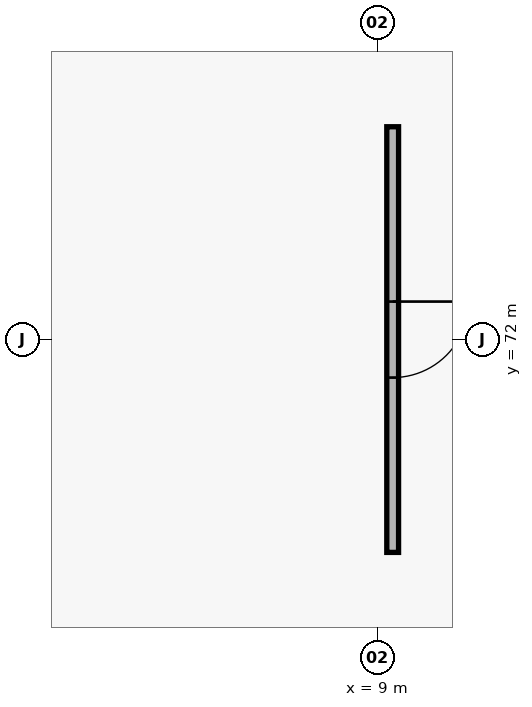
"""IFC4 building model, lengths in metres.
Left out: names, types, materials, properties, quantities, classifications, styles, units other than length and angle.
Written with IfcOpenShell. Run it as: python <this file> out.ifc"""

import sys

from ifc_helpers import new_model, si_unit, direction, frame, frame_2d, origin, place, context, subcontext, project, spatial, rectangle, extrude, element, fill, save


model = new_model("IFC4")
c1 = context("Model", 3, precision=1e-05, world=origin(), true_north=direction((0.0, 1.0)))
c2 = subcontext(c1, "Body", "Model", "MODEL_VIEW")
j1 = project(units=[si_unit("LENGTHUNIT", "METRE"), si_unit("PLANEANGLEUNIT", "RADIAN")], contexts=[c1])
p1 = place(None, origin())
s1 = spatial("IfcSite", under=j1, at=p1, CompositionType="ELEMENT")
p2 = place(p1, origin())
s2 = spatial("IfcBuilding", under=s1, at=p2, CompositionType="ELEMENT")
p3 = place(p2, frame((0.0, 0.0, 5.4)))
s3 = spatial("IfcBuildingStorey", under=s2, at=p3, CompositionType="ELEMENT", Elevation=5.4)
p4 = place(p3, frame((9.2, 69.2, 0.0), z_axis=(0.0, 0.0, 1.0), x_axis=(0.0, 1.0, 0.0)))
e1 = element("IfcWall", 1, at=p4, inside=s3, PredefinedType="PARTITIONING", context=c2, shape_type="SweptSolid", body=[
    extrude(rectangle(XDim=5.6, YDim=0.155, at=frame_2d((2.8, 0.0))), origin(), (0.0, 0.0, 1.0), 3.2),
])
p5 = place(p4, frame((2.3, 0.0, 0.0)))
e2 = element("IfcOpeningElement", 2, at=p5, cuts=e1, PredefinedType="OPENING", context=c2, shape_type="SweptSolid", body=[
    extrude(rectangle(XDim=1.0, YDim=2.1, at=frame_2d((0.5, 1.05))), frame((0.0, 0.087, 0.0), z_axis=(0.0, -1.0, 0.0), x_axis=(1.0, 0.0, 0.0)), (0.0, 0.0, 1.0), 0.175),
])
p6 = place(p5, origin())
e3 = element("IfcDoor", 3, at=p6, inside=s3, OperationType="SINGLE_SWING_RIGHT", PredefinedType="DOOR", context=c2, shape_type="SweptSolid", body=[
    extrude(rectangle(XDim=1.0, YDim=2.1, at=frame_2d((0.5, 1.05))), frame((0.0, 0.025, 0.0), z_axis=(0.0, -1.0, 0.0), x_axis=(1.0, 0.0, 0.0)), (0.0, 0.0, 1.0), 0.05),
])
fill(e2, e3)
save(model, sys.argv[1])
